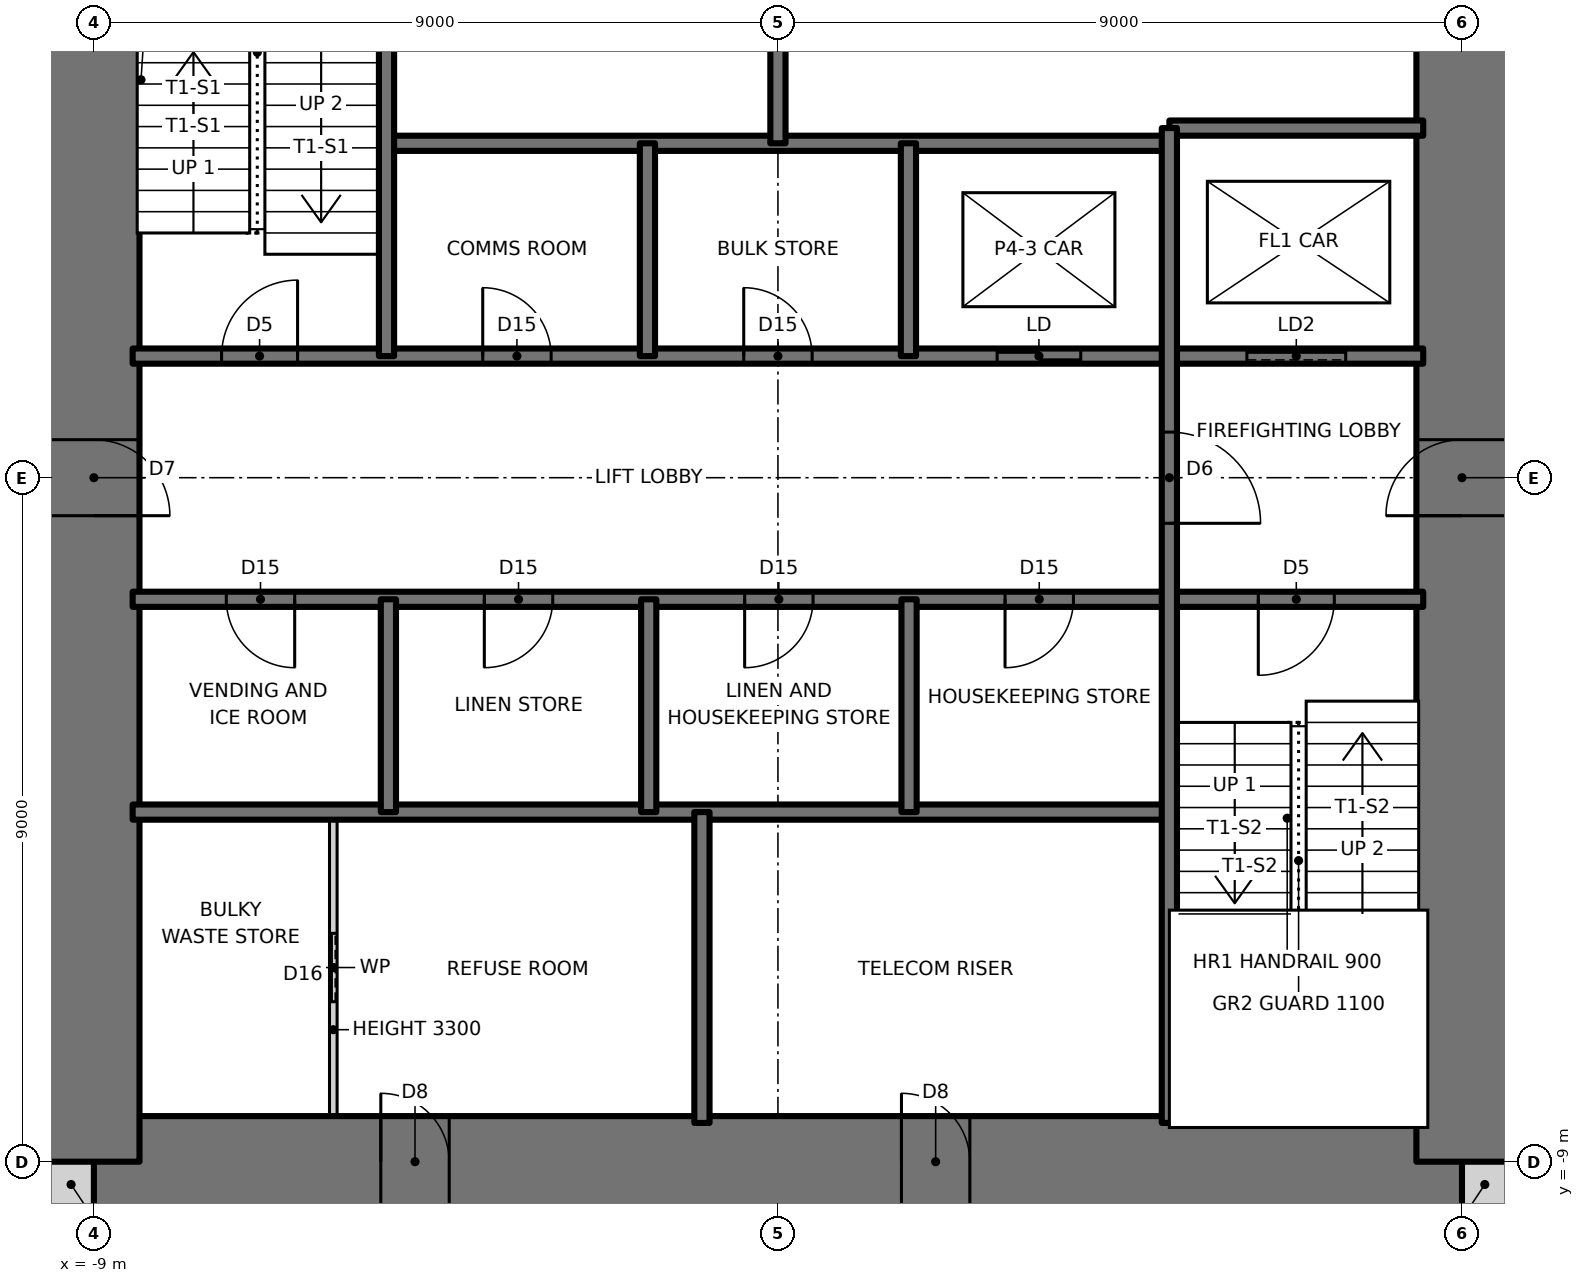
"""IFC4 building model, lengths in metres.
Left out: names, types, materials, properties, quantities, classifications, styles, units other than length and angle.
Written with IfcOpenShell. Run it as: python <this file> out.ifc"""

import sys

from ifc_helpers import new_model, si_unit, direction, frame, frame_2d, origin, place, context, subcontext, project, spatial, rectangle, extrude, element, fill, save


model = new_model("IFC4")
c1 = context("Model", 3, precision=1e-05, world=origin(), true_north=direction((0.0, 1.0)))
c2 = subcontext(c1, "Body", "Model", "MODEL_VIEW")
j1 = project(units=[si_unit("LENGTHUNIT", "METRE"), si_unit("PLANEANGLEUNIT", "RADIAN")], contexts=[c1])
p1 = place(None, origin())
s1 = spatial("IfcSite", under=j1, at=p1, CompositionType="ELEMENT")
p2 = place(p1, origin())
s2 = spatial("IfcBuilding", under=s1, at=p2, CompositionType="ELEMENT")
p3 = place(p2, frame((0.0, 0.0, 232.5)))
s3 = spatial("IfcBuildingStorey", under=s2, at=p3, CompositionType="ELEMENT", Elevation=232.5)
for number, where, z_axis, x_axis in (
    (1, (-9.6, -9.3, 0.0), (0.0, 0.0, 1.0), (1.0, 0.0, 0.0)),
    (2, (9.0, -9.3, 0.0), (0.0, 0.0, 1.0), (1.0, 0.0, 0.0)),
):
    element("IfcWall", number, at=place(p3, frame(where, z_axis=z_axis, x_axis=x_axis)), inside=s3, PredefinedType="SOLIDWALL", context=c2, shape_type="SweptSolid", body=[
        extrude(rectangle(XDim=0.6, YDim=0.6, at=frame_2d((0.3, 0.0))), origin(), (0.0, 0.0, 1.0), 3.5),
    ])
p4 = place(p3, frame((-9.0, -9.0, 0.0), z_axis=(0.0, 0.0, 1.0), x_axis=(1.0, 0.0, 0.0)))
e3 = element("IfcWall", 3, at=p4, inside=s3, PredefinedType="SHEAR", context=c2, shape_type="SweptSolid", body=[
    extrude(rectangle(XDim=18.0, YDim=1.2, at=frame_2d((9.0, 0.0))), origin(), (0.0, 0.0, 1.0), 3.5),
])
p5 = place(p4, frame((3.775, 0.0, 0.0)))
e4 = element("IfcOpeningElement", 4, at=p5, cuts=e3, PredefinedType="OPENING", context=c2, shape_type="SweptSolid", body=[
    extrude(rectangle(XDim=0.9, YDim=2.1, at=frame_2d((0.45, 1.05))), frame((0.0, 0.61, 0.0), z_axis=(0.0, -1.0, 0.0), x_axis=(1.0, 0.0, 0.0)), (0.0, 0.0, 1.0), 1.22),
])
p6 = place(p4, frame((10.625, 0.0, 0.0)))
e5 = element("IfcOpeningElement", 5, at=p6, cuts=e3, PredefinedType="OPENING", context=c2, shape_type="SweptSolid", body=[
    extrude(rectangle(XDim=0.9, YDim=2.1, at=frame_2d((0.45, 1.05))), frame((0.0, 0.61, 0.0), z_axis=(0.0, -1.0, 0.0), x_axis=(1.0, 0.0, 0.0)), (0.0, 0.0, 1.0), 1.22),
])
p7 = place(p3, frame((9.0, -9.0, 0.0), z_axis=(0.0, 0.0, 1.0), x_axis=(0.0, 1.0, 0.0)))
e6 = element("IfcWall", 6, at=p7, inside=s3, PredefinedType="SHEAR", context=c2, shape_type="SweptSolid", body=[
    extrude(rectangle(XDim=18.0, YDim=1.2, at=frame_2d((9.0, 0.0))), origin(), (0.0, 0.0, 1.0), 3.5),
])
p8 = place(p7, frame((8.5, 0.0, 0.0)))
e7 = element("IfcOpeningElement", 7, at=p8, cuts=e6, PredefinedType="OPENING", context=c2, shape_type="SweptSolid", body=[
    extrude(rectangle(XDim=1.0, YDim=2.1, at=frame_2d((0.5, 1.05))), frame((0.0, 0.61, 0.0), z_axis=(0.0, -1.0, 0.0), x_axis=(1.0, 0.0, 0.0)), (0.0, 0.0, 1.0), 1.22),
])
p9 = place(p3, frame((-9.0, 9.0, 0.0), z_axis=(0.0, 0.0, 1.0), x_axis=(0.0, -1.0, 0.0)))
e8 = element("IfcWall", 8, at=p9, inside=s3, PredefinedType="SHEAR", context=c2, shape_type="SweptSolid", body=[
    extrude(rectangle(XDim=18.0, YDim=1.2, at=frame_2d((9.0, 0.0))), origin(), (0.0, 0.0, 1.0), 3.5),
])
p10 = place(p9, frame((8.5, 0.0, 0.0)))
e9 = element("IfcOpeningElement", 9, at=p10, cuts=e8, PredefinedType="OPENING", context=c2, shape_type="SweptSolid", body=[
    extrude(rectangle(XDim=1.0, YDim=2.1, at=frame_2d((0.5, 1.05))), frame((0.0, 0.61, 0.0), z_axis=(0.0, -1.0, 0.0), x_axis=(1.0, 0.0, 0.0)), (0.0, 0.0, 1.0), 1.22),
])
p11 = place(p3, frame((-8.49, -4.4, 0.0), z_axis=(0.0, 0.0, 1.0), x_axis=(1.0, 0.0, 0.0)))
e10 = element("IfcWall", 10, at=p11, inside=s3, PredefinedType="SOLIDWALL", context=c2, shape_type="SweptSolid", body=[
    extrude(rectangle(XDim=13.64, YDim=0.2, at=frame_2d((6.82, 0.0))), origin(), (0.0, 0.0, 1.0), 3.5),
])
p12 = place(p3, frame((-8.49, -1.6, 0.0), z_axis=(0.0, 0.0, 1.0), x_axis=(1.0, 0.0, 0.0)))
e11 = element("IfcWall", 11, at=p12, inside=s3, PredefinedType="SOLIDWALL", context=c2, shape_type="SweptSolid", body=[
    extrude(rectangle(XDim=16.98, YDim=0.2, at=frame_2d((8.49, 0.0))), origin(), (0.0, 0.0, 1.0), 3.5),
])
p13 = place(p12, frame((14.81, 0.0, 0.0)))
e12 = element("IfcOpeningElement", 12, at=p13, cuts=e11, PredefinedType="OPENING", context=c2, shape_type="SweptSolid", body=[
    extrude(rectangle(XDim=1.0, YDim=2.1, at=frame_2d((0.5, 1.05))), frame((0.0, 0.11, 0.0), z_axis=(0.0, -1.0, 0.0), x_axis=(1.0, 0.0, 0.0)), (0.0, 0.0, 1.0), 0.22),
])
p14 = place(p12, frame((1.232, 0.0, 0.0)))
e13 = element("IfcOpeningElement", 13, at=p14, cuts=e11, PredefinedType="OPENING", context=c2, shape_type="SweptSolid", body=[
    extrude(rectangle(XDim=0.9, YDim=2.1, at=frame_2d((0.45, 1.05))), frame((0.0, 0.11, 0.0), z_axis=(0.0, -1.0, 0.0), x_axis=(1.0, 0.0, 0.0)), (0.0, 0.0, 1.0), 0.22),
])
p15 = place(p12, frame((4.627, 0.0, 0.0)))
e14 = element("IfcOpeningElement", 14, at=p15, cuts=e11, PredefinedType="OPENING", context=c2, shape_type="SweptSolid", body=[
    extrude(rectangle(XDim=0.9, YDim=2.1, at=frame_2d((0.45, 1.05))), frame((0.0, 0.11, 0.0), z_axis=(0.0, -1.0, 0.0), x_axis=(1.0, 0.0, 0.0)), (0.0, 0.0, 1.0), 0.22),
])
p16 = place(p12, frame((8.052, 0.0, 0.0)))
e15 = element("IfcOpeningElement", 15, at=p16, cuts=e11, PredefinedType="OPENING", context=c2, shape_type="SweptSolid", body=[
    extrude(rectangle(XDim=0.9, YDim=2.1, at=frame_2d((0.45, 1.05))), frame((0.0, 0.11, 0.0), z_axis=(0.0, -1.0, 0.0), x_axis=(1.0, 0.0, 0.0)), (0.0, 0.0, 1.0), 0.22),
])
p17 = place(p12, frame((11.478, 0.0, 0.0)))
e16 = element("IfcOpeningElement", 16, at=p17, cuts=e11, PredefinedType="OPENING", context=c2, shape_type="SweptSolid", body=[
    extrude(rectangle(XDim=0.9, YDim=2.1, at=frame_2d((0.45, 1.05))), frame((0.0, 0.11, 0.0), z_axis=(0.0, -1.0, 0.0), x_axis=(1.0, 0.0, 0.0)), (0.0, 0.0, 1.0), 0.22),
])
p18 = place(p3, frame((-8.49, 1.6, 0.0), z_axis=(0.0, 0.0, 1.0), x_axis=(1.0, 0.0, 0.0)))
e17 = element("IfcWall", 17, at=p18, inside=s3, PredefinedType="SOLIDWALL", context=c2, shape_type="SweptSolid", body=[
    extrude(rectangle(XDim=16.98, YDim=0.2, at=frame_2d((8.49, 0.0))), origin(), (0.0, 0.0, 1.0), 3.5),
])
p19 = place(p18, frame((1.17, 0.0, 0.0)))
e18 = element("IfcOpeningElement", 18, at=p19, cuts=e17, PredefinedType="OPENING", context=c2, shape_type="SweptSolid", body=[
    extrude(rectangle(XDim=1.0, YDim=2.1, at=frame_2d((0.5, 1.05))), frame((0.0, 0.11, 0.0), z_axis=(0.0, -1.0, 0.0), x_axis=(1.0, 0.0, 0.0)), (0.0, 0.0, 1.0), 0.22),
])
p20 = place(p18, frame((4.606, 0.0, 0.0)))
e19 = element("IfcOpeningElement", 19, at=p20, cuts=e17, PredefinedType="OPENING", context=c2, shape_type="SweptSolid", body=[
    extrude(rectangle(XDim=0.9, YDim=2.1, at=frame_2d((0.45, 1.05))), frame((0.0, 0.11, 0.0), z_axis=(0.0, -1.0, 0.0), x_axis=(1.0, 0.0, 0.0)), (0.0, 0.0, 1.0), 0.22),
])
p21 = place(p18, frame((8.04, 0.0, 0.0)))
e20 = element("IfcOpeningElement", 20, at=p21, cuts=e17, PredefinedType="OPENING", context=c2, shape_type="SweptSolid", body=[
    extrude(rectangle(XDim=0.9, YDim=2.1, at=frame_2d((0.45, 1.05))), frame((0.0, 0.11, 0.0), z_axis=(0.0, -1.0, 0.0), x_axis=(1.0, 0.0, 0.0)), (0.0, 0.0, 1.0), 0.22),
])
p22 = place(p18, frame((11.374, 0.0, 0.0)))
e21 = element("IfcOpeningElement", 21, at=p22, cuts=e17, PredefinedType="OPENING", context=c2, shape_type="SweptSolid", body=[
    extrude(rectangle(XDim=1.1, YDim=2.1, at=frame_2d((0.55, 1.05))), frame((0.0, 0.11, 0.0), z_axis=(0.0, -1.0, 0.0), x_axis=(1.0, 0.0, 0.0)), (0.0, 0.0, 1.0), 0.22),
])
p23 = place(p18, frame((14.66, 0.0, 0.0)))
e22 = element("IfcOpeningElement", 22, at=p23, cuts=e17, PredefinedType="OPENING", context=c2, shape_type="SweptSolid", body=[
    extrude(rectangle(XDim=1.3, YDim=2.1, at=frame_2d((0.65, 1.05))), frame((0.0, 0.11, 0.0), z_axis=(0.0, -1.0, 0.0), x_axis=(1.0, 0.0, 0.0)), (0.0, 0.0, 1.0), 0.22),
])
p24 = place(p3, frame((-5.15, 4.4, 0.0), z_axis=(0.0, 0.0, 1.0), x_axis=(1.0, 0.0, 0.0)))
e23 = element("IfcWall", 23, at=p24, inside=s3, PredefinedType="SOLIDWALL", context=c2, shape_type="SweptSolid", body=[
    extrude(rectangle(XDim=10.3, YDim=0.2, at=frame_2d((5.15, 0.0))), origin(), (0.0, 0.0, 1.0), 3.5),
])
p25 = place(p3, frame((5.15, 4.6, 0.0), z_axis=(0.0, 0.0, 1.0), x_axis=(1.0, 0.0, 0.0)))
e24 = element("IfcWall", 24, at=p25, inside=s3, PredefinedType="SOLIDWALL", context=c2, shape_type="SweptSolid", body=[
    extrude(rectangle(XDim=3.34, YDim=0.2, at=frame_2d((1.67, 0.0))), origin(), (0.0, 0.0, 1.0), 3.5),
])
p26 = place(p3, frame((5.15, -8.49, 0.0), z_axis=(0.0, 0.0, 1.0), x_axis=(0.0, 1.0, 0.0)))
e25 = element("IfcWall", 25, at=p26, inside=s3, PredefinedType="SOLIDWALL", context=c2, shape_type="SweptSolid", body=[
    extrude(rectangle(XDim=13.09, YDim=0.2, at=frame_2d((6.545, 0.0))), origin(), (0.0, 0.0, 1.0), 3.5),
])
p27 = place(p26, frame((7.89, 0.0, 0.0)))
e26 = element("IfcOpeningElement", 26, at=p27, cuts=e25, PredefinedType="OPENING", context=c2, shape_type="SweptSolid", body=[
    extrude(rectangle(XDim=1.2, YDim=2.1, at=frame_2d((0.6, 1.05))), frame((0.0, 0.11, 0.0), z_axis=(0.0, -1.0, 0.0), x_axis=(1.0, 0.0, 0.0)), (0.0, 0.0, 1.0), 0.22),
])
for number, where, z_axis, x_axis in (
    (27, (1.725, -4.4, 0.0), (0.0, 0.0, 1.0), (0.0, 1.0, 0.0)),
    (28, (1.717, 1.6, 0.0), (0.0, 0.0, 1.0), (0.0, 1.0, 0.0)),
):
    element("IfcWall", number, at=place(p3, frame(where, z_axis=z_axis, x_axis=x_axis)), inside=s3, PredefinedType="SOLIDWALL", context=c2, shape_type="SweptSolid", body=[
        extrude(rectangle(XDim=2.8, YDim=0.2, at=frame_2d((1.4, 0.0))), origin(), (0.0, 0.0, 1.0), 3.5),
    ])
for number, where, z_axis, x_axis in (
    (29, (0.0, 4.4, 0.0), (0.0, 0.0, 1.0), (0.0, 1.0, 0.0)),
    (30, (-1.0, -8.49, 0.0), (0.0, 0.0, 1.0), (0.0, 1.0, 0.0)),
):
    element("IfcWall", number, at=place(p3, frame(where, z_axis=z_axis, x_axis=x_axis)), inside=s3, PredefinedType="SOLIDWALL", context=c2, shape_type="SweptSolid", body=[
        extrude(rectangle(XDim=4.09, YDim=0.2, at=frame_2d((2.045, 0.0))), origin(), (0.0, 0.0, 1.0), 3.5),
    ])
for number, where, z_axis, x_axis in (
    (31, (-1.7, -4.4, 0.0), (0.0, 0.0, 1.0), (0.0, 1.0, 0.0)),
    (32, (-1.717, 1.6, 0.0), (0.0, 0.0, 1.0), (0.0, 1.0, 0.0)),
    (33, (-5.125, -4.4, 0.0), (0.0, 0.0, 1.0), (0.0, 1.0, 0.0)),
):
    element("IfcWall", number, at=place(p3, frame(where, z_axis=z_axis, x_axis=x_axis)), inside=s3, PredefinedType="SOLIDWALL", context=c2, shape_type="SweptSolid", body=[
        extrude(rectangle(XDim=2.8, YDim=0.2, at=frame_2d((1.4, 0.0))), origin(), (0.0, 0.0, 1.0), 3.5),
    ])
p28 = place(p3, frame((-5.15, 1.6, 0.0), z_axis=(0.0, 0.0, 1.0), x_axis=(0.0, 1.0, 0.0)))
e34 = element("IfcWall", 34, at=p28, inside=s3, PredefinedType="SOLIDWALL", context=c2, shape_type="SweptSolid", body=[
    extrude(rectangle(XDim=6.89, YDim=0.2, at=frame_2d((3.445, 0.0))), origin(), (0.0, 0.0, 1.0), 3.5),
])
p29 = place(p3, frame((-5.85, -8.49, 0.0), z_axis=(0.0, 0.0, 1.0), x_axis=(0.0, 1.0, 0.0)))
e35 = element("IfcWall", 35, at=p29, inside=s3, PredefinedType="PARTITIONING", context=c2, shape_type="SweptSolid", body=[
    extrude(rectangle(XDim=4.09, YDim=0.1, at=frame_2d((2.045, 0.0))), origin(), (0.0, 0.0, 1.0), 3.3),
])
p30 = place(p29, frame((1.595, 0.0, 0.0)))
e36 = element("IfcOpeningElement", 36, at=p30, cuts=e35, PredefinedType="OPENING", context=c2, shape_type="SweptSolid", body=[
    extrude(rectangle(XDim=0.9, YDim=2.1, at=frame_2d((0.45, 1.05))), frame((0.0, 0.06, 0.0), z_axis=(0.0, -1.0, 0.0), x_axis=(1.0, 0.0, 0.0)), (0.0, 0.0, 1.0), 0.12),
])
p31 = place(p19, origin())
e37 = element("IfcDoor", 37, at=p31, inside=s3, OperationType="SINGLE_SWING_RIGHT", PredefinedType="DOOR", context=c2, shape_type="SweptSolid", body=[
    extrude(rectangle(XDim=1.0, YDim=2.1, at=frame_2d((0.5, 1.05))), frame((0.0, 0.025, 0.0), z_axis=(0.0, -1.0, 0.0), x_axis=(1.0, 0.0, 0.0)), (0.0, 0.0, 1.0), 0.05),
])
fill(e18, e37)
p32 = place(p13, frame((1.0, 0.0, 0.0), z_axis=(0.0, 0.0, 1.0), x_axis=(-1.0, 0.0, 0.0)))
e38 = element("IfcDoor", 38, at=p32, inside=s3, OperationType="SINGLE_SWING_RIGHT", PredefinedType="DOOR", context=c2, shape_type="SweptSolid", body=[
    extrude(rectangle(XDim=1.0, YDim=2.1, at=frame_2d((0.5, 1.05))), frame((0.0, 0.025, 0.0), z_axis=(0.0, -1.0, 0.0), x_axis=(1.0, 0.0, 0.0)), (0.0, 0.0, 1.0), 0.05),
])
fill(e12, e38)
p33 = place(p27, frame((1.2, 0.0, 0.0), z_axis=(0.0, 0.0, 1.0), x_axis=(-1.0, 0.0, 0.0)))
e39 = element("IfcDoor", 39, at=p33, inside=s3, OperationType="SINGLE_SWING_RIGHT", PredefinedType="DOOR", context=c2, shape_type="SweptSolid", body=[
    extrude(rectangle(XDim=1.2, YDim=2.1, at=frame_2d((0.6, 1.05))), frame((0.0, 0.025, 0.0), z_axis=(0.0, -1.0, 0.0), x_axis=(1.0, 0.0, 0.0)), (0.0, 0.0, 1.0), 0.05),
])
fill(e26, e39)
p34 = place(p20, origin())
e40 = element("IfcDoor", 40, at=p34, inside=s3, OperationType="SINGLE_SWING_LEFT", PredefinedType="DOOR", context=c2, shape_type="SweptSolid", body=[
    extrude(rectangle(XDim=0.9, YDim=2.1, at=frame_2d((0.45, 1.05))), frame((0.0, 0.025, 0.0), z_axis=(0.0, -1.0, 0.0), x_axis=(1.0, 0.0, 0.0)), (0.0, 0.0, 1.0), 0.05),
])
fill(e19, e40)
p35 = place(p21, origin())
e41 = element("IfcDoor", 41, at=p35, inside=s3, OperationType="SINGLE_SWING_LEFT", PredefinedType="DOOR", context=c2, shape_type="SweptSolid", body=[
    extrude(rectangle(XDim=0.9, YDim=2.1, at=frame_2d((0.45, 1.05))), frame((0.0, 0.025, 0.0), z_axis=(0.0, -1.0, 0.0), x_axis=(1.0, 0.0, 0.0)), (0.0, 0.0, 1.0), 0.05),
])
fill(e20, e41)
p36 = place(p14, frame((0.9, 0.0, 0.0), z_axis=(0.0, 0.0, 1.0), x_axis=(-1.0, 0.0, 0.0)))
e42 = element("IfcDoor", 42, at=p36, inside=s3, OperationType="SINGLE_SWING_LEFT", PredefinedType="DOOR", context=c2, shape_type="SweptSolid", body=[
    extrude(rectangle(XDim=0.9, YDim=2.1, at=frame_2d((0.45, 1.05))), frame((0.0, 0.025, 0.0), z_axis=(0.0, -1.0, 0.0), x_axis=(1.0, 0.0, 0.0)), (0.0, 0.0, 1.0), 0.05),
])
fill(e13, e42)
p37 = place(p15, frame((0.9, 0.0, 0.0), z_axis=(0.0, 0.0, 1.0), x_axis=(-1.0, 0.0, 0.0)))
e43 = element("IfcDoor", 43, at=p37, inside=s3, OperationType="SINGLE_SWING_RIGHT", PredefinedType="DOOR", context=c2, shape_type="SweptSolid", body=[
    extrude(rectangle(XDim=0.9, YDim=2.1, at=frame_2d((0.45, 1.05))), frame((0.0, 0.025, 0.0), z_axis=(0.0, -1.0, 0.0), x_axis=(1.0, 0.0, 0.0)), (0.0, 0.0, 1.0), 0.05),
])
fill(e14, e43)
p38 = place(p16, frame((0.9, 0.0, 0.0), z_axis=(0.0, 0.0, 1.0), x_axis=(-1.0, 0.0, 0.0)))
e44 = element("IfcDoor", 44, at=p38, inside=s3, OperationType="SINGLE_SWING_RIGHT", PredefinedType="DOOR", context=c2, shape_type="SweptSolid", body=[
    extrude(rectangle(XDim=0.9, YDim=2.1, at=frame_2d((0.45, 1.05))), frame((0.0, 0.025, 0.0), z_axis=(0.0, -1.0, 0.0), x_axis=(1.0, 0.0, 0.0)), (0.0, 0.0, 1.0), 0.05),
])
fill(e15, e44)
p39 = place(p17, frame((0.9, 0.0, 0.0), z_axis=(0.0, 0.0, 1.0), x_axis=(-1.0, 0.0, 0.0)))
e45 = element("IfcDoor", 45, at=p39, inside=s3, OperationType="SINGLE_SWING_RIGHT", PredefinedType="DOOR", context=c2, shape_type="SweptSolid", body=[
    extrude(rectangle(XDim=0.9, YDim=2.1, at=frame_2d((0.45, 1.05))), frame((0.0, 0.025, 0.0), z_axis=(0.0, -1.0, 0.0), x_axis=(1.0, 0.0, 0.0)), (0.0, 0.0, 1.0), 0.05),
])
fill(e16, e45)
p40 = place(p30, origin())
e46 = element("IfcDoor", 46, at=p40, inside=s3, OperationType="SLIDING_TO_LEFT", PredefinedType="DOOR", context=c2, shape_type="SweptSolid", body=[
    extrude(rectangle(XDim=0.9, YDim=2.1, at=frame_2d((0.45, 1.05))), frame((0.0, 0.025, 0.0), z_axis=(0.0, -1.0, 0.0), x_axis=(1.0, 0.0, 0.0)), (0.0, 0.0, 1.0), 0.05),
])
fill(e36, e46)
p41 = place(p10, origin())
e47 = element("IfcDoor", 47, at=p41, inside=s3, OperationType="SINGLE_SWING_RIGHT", PredefinedType="DOOR", context=c2, shape_type="SweptSolid", body=[
    extrude(rectangle(XDim=1.0, YDim=2.1, at=frame_2d((0.5, 1.05))), frame((0.0, 0.025, 0.0), z_axis=(0.0, -1.0, 0.0), x_axis=(1.0, 0.0, 0.0)), (0.0, 0.0, 1.0), 0.05),
])
fill(e9, e47)
p42 = place(p8, origin())
e48 = element("IfcDoor", 48, at=p42, inside=s3, OperationType="SINGLE_SWING_LEFT", PredefinedType="DOOR", context=c2, shape_type="SweptSolid", body=[
    extrude(rectangle(XDim=1.0, YDim=2.1, at=frame_2d((0.5, 1.05))), frame((0.0, 0.025, 0.0), z_axis=(0.0, -1.0, 0.0), x_axis=(1.0, 0.0, 0.0)), (0.0, 0.0, 1.0), 0.05),
])
fill(e7, e48)
p43 = place(p5, origin())
e49 = element("IfcDoor", 49, at=p43, inside=s3, OperationType="SINGLE_SWING_LEFT", PredefinedType="DOOR", context=c2, shape_type="SweptSolid", body=[
    extrude(rectangle(XDim=0.9, YDim=2.1, at=frame_2d((0.45, 1.05))), frame((0.0, 0.025, 0.0), z_axis=(0.0, -1.0, 0.0), x_axis=(1.0, 0.0, 0.0)), (0.0, 0.0, 1.0), 0.05),
])
fill(e4, e49)
p44 = place(p6, origin())
e50 = element("IfcDoor", 50, at=p44, inside=s3, OperationType="SINGLE_SWING_LEFT", PredefinedType="DOOR", context=c2, shape_type="SweptSolid", body=[
    extrude(rectangle(XDim=0.9, YDim=2.1, at=frame_2d((0.45, 1.05))), frame((0.0, 0.025, 0.0), z_axis=(0.0, -1.0, 0.0), x_axis=(1.0, 0.0, 0.0)), (0.0, 0.0, 1.0), 0.05),
])
fill(e5, e50)
p45 = place(p22, origin())
e51 = element("IfcDoor", 51, at=p45, inside=s3, OperationType="DOUBLE_DOOR_SLIDING", PredefinedType="DOOR", context=c2, shape_type="SweptSolid", body=[
    extrude(rectangle(XDim=1.1, YDim=2.1, at=frame_2d((0.55, 1.05))), frame((0.0, 0.025, 0.0), z_axis=(0.0, -1.0, 0.0), x_axis=(1.0, 0.0, 0.0)), (0.0, 0.0, 1.0), 0.05),
])
fill(e21, e51)
p46 = place(p23, origin())
e52 = element("IfcDoor", 52, at=p46, inside=s3, OperationType="SLIDING_TO_LEFT", PredefinedType="DOOR", context=c2, shape_type="SweptSolid", body=[
    extrude(rectangle(XDim=1.3, YDim=2.1, at=frame_2d((0.65, 1.05))), frame((0.0, 0.025, 0.0), z_axis=(0.0, -1.0, 0.0), x_axis=(1.0, 0.0, 0.0)), (0.0, 0.0, 1.0), 0.05),
])
fill(e22, e52)
save(model, sys.argv[1])
